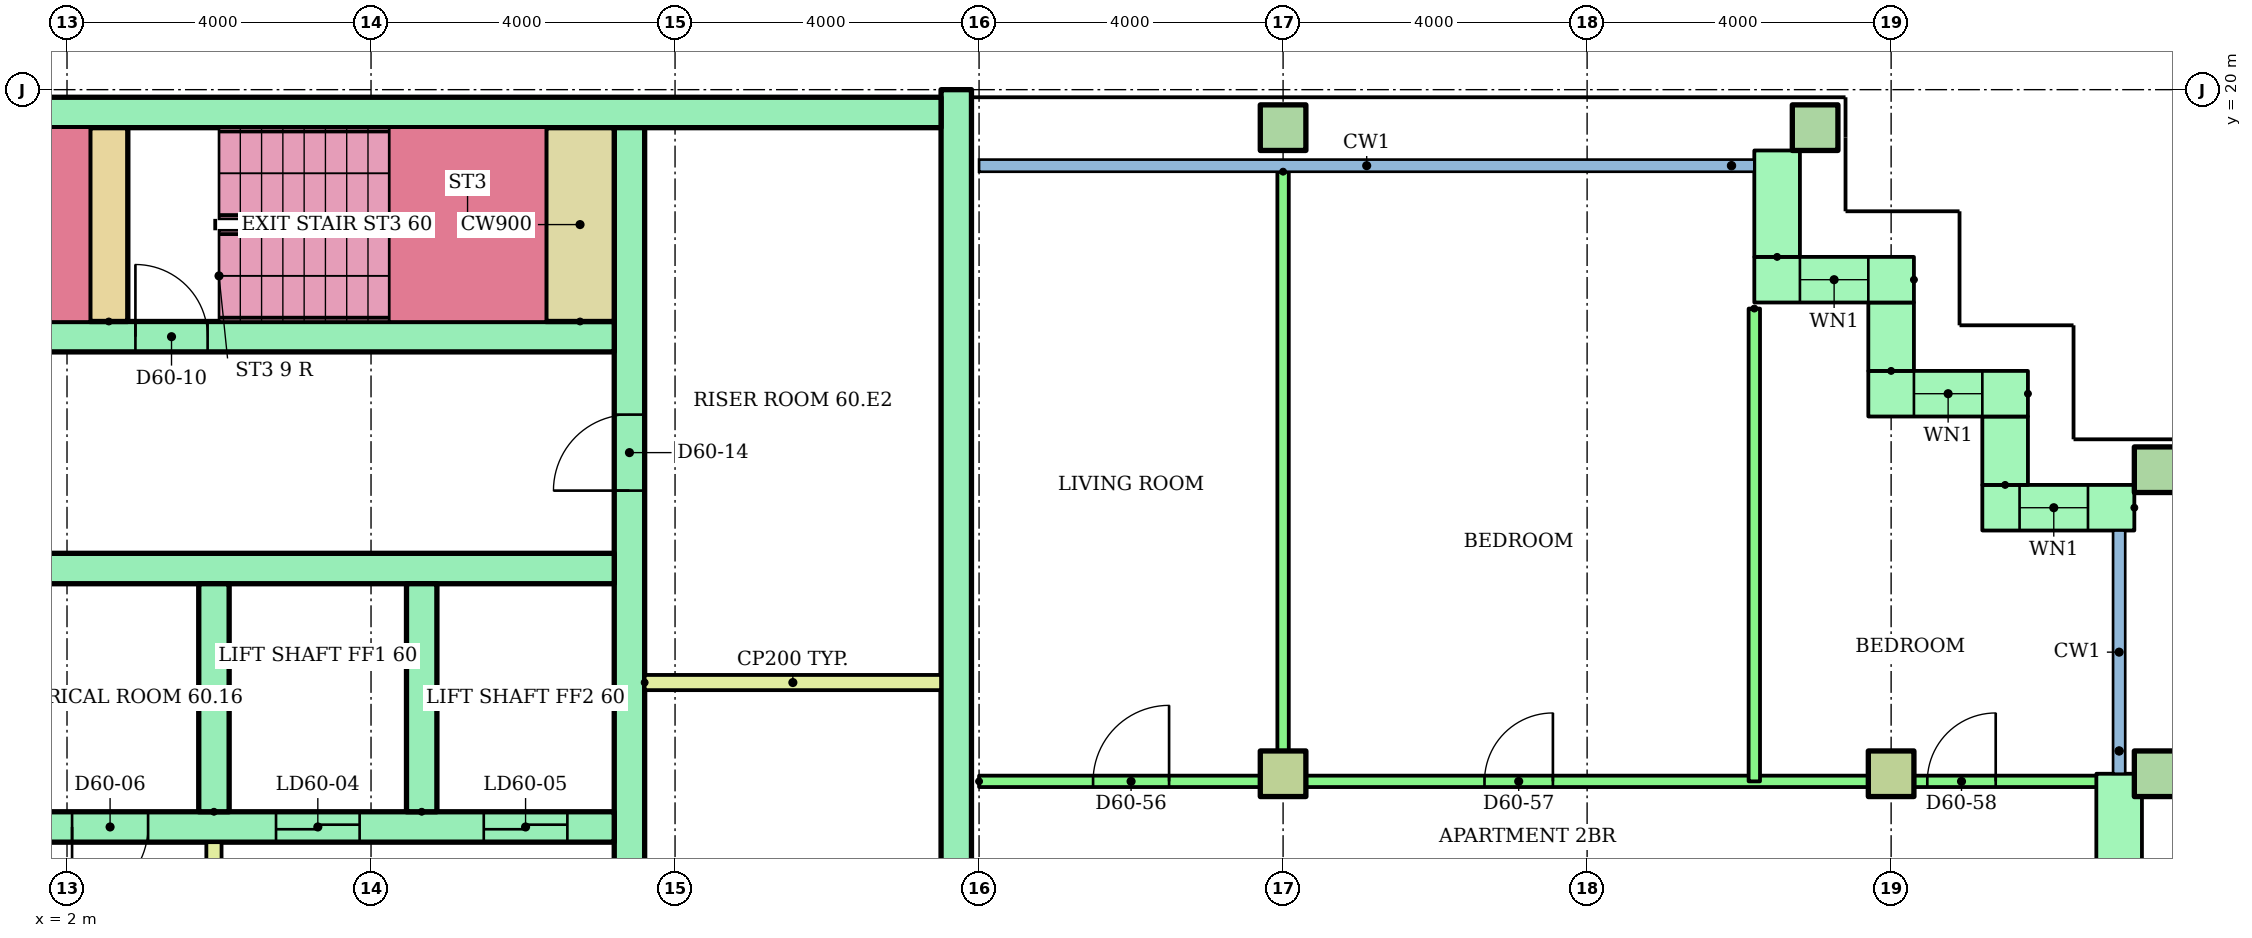
"""IFC4 building model, lengths in metres.
Left out: names, types, materials, properties, quantities, classifications, styles, units other than length and angle.
Written with IfcOpenShell. Run it as: python <this file> out.ifc"""

import sys

from ifc_helpers import new_model, si_unit, direction, frame, frame_2d, origin, origin_2d, place, context, subcontext, project, spatial, rectangle, hollow_rectangle, extrude, element, fill, save


model = new_model("IFC4")
c1 = context("Model", 3, precision=1e-05, world=origin(), true_north=direction((0.0, 1.0)))
c2 = subcontext(c1, "Body", "Model", "MODEL_VIEW")
j1 = project(units=[si_unit("LENGTHUNIT", "METRE"), si_unit("PLANEANGLEUNIT", "RADIAN")], contexts=[c1])
p1 = place(None, origin())
s1 = spatial("IfcSite", under=j1, at=p1, CompositionType="ELEMENT")
p2 = place(p1, origin())
s2 = spatial("IfcBuilding", under=s1, at=p2, CompositionType="ELEMENT")
p3 = place(p2, frame((0.0, 0.0, 230.0)))
s3 = spatial("IfcBuildingStorey", under=s2, at=p3, CompositionType="ELEMENT", Elevation=230.0)
for number, where in (
    (1, (18.0, 11.0, 0.0)),
    (2, (26.0, 11.0, 0.0)),
):
    element("IfcColumn", number, at=place(p3, frame(where)), inside=s3, PredefinedType="COLUMN", context=c2, shape_type="SweptSolid", body=[
        extrude(rectangle(XDim=0.6, YDim=0.6, at=origin_2d()), origin(), (0.0, 0.0, 1.0), 3.2),
    ])
for number, where in (
    (3, (29.5, 11.0, 0.0)),
    (4, (29.5, 15.0, 0.0)),
    (5, (18.0, 19.5, 0.0)),
    (6, (25.0, 19.5, 0.0)),
):
    element("IfcColumn", number, at=place(p3, frame(where)), inside=s3, PredefinedType="COLUMN", context=c2, shape_type="SweptSolid", body=[
        extrude(hollow_rectangle(XDim=0.6, YDim=0.6, WallThickness=0.03, at=origin_2d()), origin(), (0.0, 0.0, 1.0), 3.2),
    ])
p4 = place(p3, frame((29.2, 14.5, 0.0), z_axis=(0.0, 0.0, 1.0), x_axis=(-1.0, 0.0, 0.0)))
e7 = element("IfcWall", 7, at=p4, inside=s3, PredefinedType="STANDARD", context=c2, shape_type="SweptSolid", body=[
    extrude(rectangle(XDim=2.0, YDim=0.6, at=frame_2d((1.0, 0.0))), origin(), (0.0, 0.0, 1.0), 2.92),
])
p5 = place(p4, frame((0.61, 0.0, 0.9)))
e8 = element("IfcOpeningElement", 8, at=p5, cuts=e7, PredefinedType="OPENING", context=c2, shape_type="SweptSolid", body=[
    extrude(rectangle(XDim=0.9, YDim=1.5, at=frame_2d((0.45, 0.75))), frame((0.0, 0.31, 0.0), z_axis=(0.0, -1.0, 0.0), x_axis=(1.0, 0.0, 0.0)), (0.0, 0.0, 1.0), 0.62),
])
p6 = place(p3, frame((27.5, 14.8, 0.0), z_axis=(0.0, 0.0, 1.0), x_axis=(0.0, 1.0, 0.0)))
e9 = element("IfcWall", 9, at=p6, inside=s3, PredefinedType="STANDARD", context=c2, shape_type="SweptSolid", body=[
    extrude(rectangle(XDim=0.9, YDim=0.6, at=frame_2d((0.45, 0.0))), origin(), (0.0, 0.0, 1.0), 2.92),
])
p7 = place(p3, frame((27.8, 16.0, 0.0), z_axis=(0.0, 0.0, 1.0), x_axis=(-1.0, 0.0, 0.0)))
e10 = element("IfcWall", 10, at=p7, inside=s3, PredefinedType="STANDARD", context=c2, shape_type="SweptSolid", body=[
    extrude(rectangle(XDim=2.1, YDim=0.6, at=frame_2d((1.05, 0.0))), origin(), (0.0, 0.0, 1.0), 2.92),
])
p8 = place(p7, frame((0.6, 0.0, 0.9)))
e11 = element("IfcOpeningElement", 11, at=p8, cuts=e10, PredefinedType="OPENING", context=c2, shape_type="SweptSolid", body=[
    extrude(rectangle(XDim=0.9, YDim=1.5, at=frame_2d((0.45, 0.75))), frame((0.0, 0.31, 0.0), z_axis=(0.0, -1.0, 0.0), x_axis=(1.0, 0.0, 0.0)), (0.0, 0.0, 1.0), 0.62),
])
p9 = place(p3, frame((26.0, 16.3, 0.0), z_axis=(0.0, 0.0, 1.0), x_axis=(0.0, 1.0, 0.0)))
e12 = element("IfcWall", 12, at=p9, inside=s3, PredefinedType="STANDARD", context=c2, shape_type="SweptSolid", body=[
    extrude(rectangle(XDim=0.9, YDim=0.6, at=frame_2d((0.45, 0.0))), origin(), (0.0, 0.0, 1.0), 2.92),
])
p10 = place(p3, frame((26.3, 17.5, 0.0), z_axis=(0.0, 0.0, 1.0), x_axis=(-1.0, 0.0, 0.0)))
e13 = element("IfcWall", 13, at=p10, inside=s3, PredefinedType="STANDARD", context=c2, shape_type="SweptSolid", body=[
    extrude(rectangle(XDim=2.1, YDim=0.6, at=frame_2d((1.05, 0.0))), origin(), (0.0, 0.0, 1.0), 2.92),
])
p11 = place(p10, frame((0.6, 0.0, 0.9)))
e14 = element("IfcOpeningElement", 14, at=p11, cuts=e13, PredefinedType="OPENING", context=c2, shape_type="SweptSolid", body=[
    extrude(rectangle(XDim=0.9, YDim=1.5, at=frame_2d((0.45, 0.75))), frame((0.0, 0.31, 0.0), z_axis=(0.0, -1.0, 0.0), x_axis=(1.0, 0.0, 0.0)), (0.0, 0.0, 1.0), 0.62),
])
p12 = place(p3, frame((24.5, 17.8, 0.0), z_axis=(0.0, 0.0, 1.0), x_axis=(0.0, 1.0, 0.0)))
e15 = element("IfcWall", 15, at=p12, inside=s3, PredefinedType="STANDARD", context=c2, shape_type="SweptSolid", body=[
    extrude(rectangle(XDim=1.4, YDim=0.6, at=frame_2d((0.7, 0.0))), origin(), (0.0, 0.0, 1.0), 2.92),
])
p13 = place(p3, frame((29.0, 6.5, 0.0), z_axis=(0.0, 0.0, 1.0), x_axis=(0.0, 1.0, 0.0)))
e16 = element("IfcWall", 16, at=p13, inside=s3, PredefinedType="STANDARD", context=c2, shape_type="SweptSolid", body=[
    extrude(rectangle(XDim=4.5, YDim=0.6, at=frame_2d((2.25, 0.0))), origin(), (0.0, 0.0, 1.0), 2.92),
])
p14 = place(p13, frame((1.525, 0.0, 0.0)))
e17 = element("IfcOpeningElement", 17, at=p14, cuts=e16, PredefinedType="OPENING", context=c2, shape_type="SweptSolid", body=[
    extrude(rectangle(XDim=1.2, YDim=2.1, at=frame_2d((0.6, 1.05))), frame((0.0, 0.31, 0.0), z_axis=(0.0, -1.0, 0.0), x_axis=(1.0, 0.0, 0.0)), (0.0, 0.0, 1.0), 0.62),
])
p15 = place(p3, frame((13.7, 3.0, 0.0), z_axis=(0.0, 0.0, 1.0), x_axis=(0.0, 1.0, 0.0)))
e18 = element("IfcWall", 18, at=p15, inside=s3, PredefinedType="SHEAR", context=c2, shape_type="SweptSolid", body=[
    extrude(rectangle(XDim=17.0, YDim=0.4, at=frame_2d((8.5, 0.0))), origin(), (0.0, 0.0, 1.0), 2.92),
])
p16 = place(p3, frame((-13.5, 19.7, 0.0)))
e19 = element("IfcWall", 19, at=p16, inside=s3, PredefinedType="SHEAR", context=c2, shape_type="SweptSolid", body=[
    extrude(rectangle(XDim=27.0, YDim=0.4, at=frame_2d((13.5, 0.0))), origin(), (0.0, 0.0, 1.0), 2.92),
])
p17 = place(p3, frame((9.4, 6.8, 0.0), z_axis=(0.0, 0.0, 1.0), x_axis=(0.0, 1.0, 0.0)))
e20 = element("IfcWall", 20, at=p17, inside=s3, PredefinedType="SHEAR", context=c2, shape_type="SweptSolid", body=[
    extrude(rectangle(XDim=12.7, YDim=0.4, at=frame_2d((6.35, 0.0))), origin(), (0.0, 0.0, 1.0), 2.92),
])
p18 = place(p17, frame((1.15, 0.0, 0.0)))
e21 = element("IfcOpeningElement", 21, at=p18, cuts=e20, PredefinedType="OPENING", context=c2, shape_type="SweptSolid", body=[
    extrude(rectangle(XDim=1.0, YDim=2.1, at=frame_2d((0.5, 1.05))), frame((0.0, 0.21, 0.0), z_axis=(0.0, -1.0, 0.0), x_axis=(1.0, 0.0, 0.0)), (0.0, 0.0, 1.0), 0.42),
])
p19 = place(p17, frame((7.925, 0.0, 0.0)))
e22 = element("IfcOpeningElement", 22, at=p19, cuts=e20, PredefinedType="OPENING", context=c2, shape_type="SweptSolid", body=[
    extrude(rectangle(XDim=1.0, YDim=2.1, at=frame_2d((0.5, 1.05))), frame((0.0, 0.21, 0.0), z_axis=(0.0, -1.0, 0.0), x_axis=(1.0, 0.0, 0.0)), (0.0, 0.0, 1.0), 0.42),
])
p20 = place(p3, frame((1.2, 10.3, 0.0)))
e23 = element("IfcWall", 23, at=p20, inside=s3, PredefinedType="SHEAR", context=c2, shape_type="SweptSolid", body=[
    extrude(rectangle(XDim=8.0, YDim=0.4, at=frame_2d((4.0, 0.0))), origin(), (0.0, 0.0, 1.0), 2.92),
])
p21 = place(p20, frame((3.55, 0.0, 0.0)))
e24 = element("IfcOpeningElement", 24, at=p21, cuts=e23, PredefinedType="OPENING", context=c2, shape_type="SweptSolid", body=[
    extrude(rectangle(XDim=1.1, YDim=2.1, at=frame_2d((0.55, 1.05))), frame((0.0, 0.21, 0.0), z_axis=(0.0, -1.0, 0.0), x_axis=(1.0, 0.0, 0.0)), (0.0, 0.0, 1.0), 0.42),
])
p22 = place(p20, frame((6.283, 0.0, 0.0)))
e25 = element("IfcOpeningElement", 25, at=p22, cuts=e23, PredefinedType="OPENING", context=c2, shape_type="SweptSolid", body=[
    extrude(rectangle(XDim=1.1, YDim=2.1, at=frame_2d((0.55, 1.05))), frame((0.0, 0.21, 0.0), z_axis=(0.0, -1.0, 0.0), x_axis=(1.0, 0.0, 0.0)), (0.0, 0.0, 1.0), 0.42),
])
p23 = place(p20, frame((0.867, 0.0, 0.0)))
e26 = element("IfcOpeningElement", 26, at=p23, cuts=e23, PredefinedType="OPENING", context=c2, shape_type="SweptSolid", body=[
    extrude(rectangle(XDim=1.0, YDim=2.1, at=frame_2d((0.5, 1.05))), frame((0.0, 0.21, 0.0), z_axis=(0.0, -1.0, 0.0), x_axis=(1.0, 0.0, 0.0)), (0.0, 0.0, 1.0), 0.42),
])
p24 = place(p3, frame((1.2, 13.7, 0.0)))
e27 = element("IfcWall", 27, at=p24, inside=s3, PredefinedType="SHEAR", context=c2, shape_type="SweptSolid", body=[
    extrude(rectangle(XDim=8.0, YDim=0.4, at=frame_2d((4.0, 0.0))), origin(), (0.0, 0.0, 1.0), 2.92),
])
for number, where, z_axis, x_axis in (
    (28, (3.933, 10.5, 0.0), (0.0, 0.0, 1.0), (0.0, 1.0, 0.0)),
    (29, (6.667, 10.5, 0.0), (0.0, 0.0, 1.0), (0.0, 1.0, 0.0)),
):
    element("IfcWall", number, at=place(p3, frame(where, z_axis=z_axis, x_axis=x_axis)), inside=s3, PredefinedType="SHEAR", context=c2, shape_type="SweptSolid", body=[
        extrude(rectangle(XDim=3.0, YDim=0.4, at=frame_2d((1.5, 0.0))), origin(), (0.0, 0.0, 1.0), 2.92),
    ])
p25 = place(p3, frame((3.933, 6.8, 0.0), z_axis=(0.0, 0.0, 1.0), x_axis=(0.0, 1.0, 0.0)))
e30 = element("IfcWall", 30, at=p25, inside=s3, PredefinedType="PARTITIONING", context=c2, shape_type="SweptSolid", body=[
    extrude(rectangle(XDim=3.3, YDim=0.2, at=frame_2d((1.65, 0.0))), origin(), (0.0, 0.0, 1.0), 2.92),
])
p26 = place(p25, frame((1.1, 0.0, 0.0)))
e31 = element("IfcOpeningElement", 31, at=p26, cuts=e30, PredefinedType="OPENING", context=c2, shape_type="SweptSolid", body=[
    extrude(rectangle(XDim=1.1, YDim=2.1, at=frame_2d((0.55, 1.05))), frame((0.0, 0.11, 0.0), z_axis=(0.0, -1.0, 0.0), x_axis=(1.0, 0.0, 0.0)), (0.0, 0.0, 1.0), 0.22),
])
p27 = place(p3, frame((-9.2, 16.75, 0.0)))
e32 = element("IfcWall", 32, at=p27, inside=s3, PredefinedType="SHEAR", context=c2, shape_type="SweptSolid", body=[
    extrude(rectangle(XDim=18.4, YDim=0.4, at=frame_2d((9.2, 0.0))), origin(), (0.0, 0.0, 1.0), 2.92),
])
p28 = place(p27, frame((0.1, 0.0, 0.0)))
e33 = element("IfcOpeningElement", 33, at=p28, cuts=e32, PredefinedType="OPENING", context=c2, shape_type="SweptSolid", body=[
    extrude(rectangle(XDim=0.95, YDim=2.1, at=frame_2d((0.475, 1.05))), frame((0.0, 0.21, 0.0), z_axis=(0.0, -1.0, 0.0), x_axis=(1.0, 0.0, 0.0)), (0.0, 0.0, 1.0), 0.42),
])
p29 = place(p27, frame((6.1, 0.0, 0.0)))
e34 = element("IfcOpeningElement", 34, at=p29, cuts=e32, PredefinedType="OPENING", context=c2, shape_type="SweptSolid", body=[
    extrude(rectangle(XDim=0.95, YDim=2.1, at=frame_2d((0.475, 1.05))), frame((0.0, 0.21, 0.0), z_axis=(0.0, -1.0, 0.0), x_axis=(1.0, 0.0, 0.0)), (0.0, 0.0, 1.0), 0.42),
])
p30 = place(p27, frame((12.1, 0.0, 0.0)))
e35 = element("IfcOpeningElement", 35, at=p30, cuts=e32, PredefinedType="OPENING", context=c2, shape_type="SweptSolid", body=[
    extrude(rectangle(XDim=0.95, YDim=2.1, at=frame_2d((0.475, 1.05))), frame((0.0, 0.21, 0.0), z_axis=(0.0, -1.0, 0.0), x_axis=(1.0, 0.0, 0.0)), (0.0, 0.0, 1.0), 0.42),
])
p31 = place(p3, frame((2.55, 16.95, 0.0), z_axis=(0.0, 0.0, 1.0), x_axis=(0.0, 1.0, 0.0)))
e36 = element("IfcWall", 36, at=p31, inside=s3, PredefinedType="SHEAR", context=c2, shape_type="SweptSolid", body=[
    extrude(rectangle(XDim=2.55, YDim=0.5, at=frame_2d((1.275, 0.0))), origin(), (0.0, 0.0, 1.0), 2.92),
])
p32 = place(p3, frame((8.75, 16.95, 0.0), z_axis=(0.0, 0.0, 1.0), x_axis=(0.0, 1.0, 0.0)))
e37 = element("IfcWall", 37, at=p32, inside=s3, PredefinedType="SHEAR", context=c2, shape_type="SweptSolid", body=[
    extrude(rectangle(XDim=2.55, YDim=0.9, at=frame_2d((1.275, 0.0))), origin(), (0.0, 0.0, 1.0), 2.92),
])
p33 = place(p3, frame((9.6, 12.2, 0.0)))
e38 = element("IfcWall", 38, at=p33, inside=s3, PredefinedType="PARTITIONING", context=c2, shape_type="SweptSolid", body=[
    extrude(rectangle(XDim=3.9, YDim=0.2, at=frame_2d((1.95, 0.0))), origin(), (0.0, 0.0, 1.0), 2.92),
])
p34 = place(p3, frame((14.0, 10.9, 0.0)))
e39 = element("IfcWall", 39, at=p34, inside=s3, PredefinedType="PARTITIONING", context=c2, shape_type="SweptSolid", body=[
    extrude(rectangle(XDim=14.91, YDim=0.15, at=frame_2d((7.455, 0.0))), origin(), (0.0, 0.0, 1.0), 2.4),
])
p35 = place(p34, frame((1.5, 0.0, 0.0)))
e40 = element("IfcOpeningElement", 40, at=p35, cuts=e39, PredefinedType="OPENING", context=c2, shape_type="SweptSolid", body=[
    extrude(rectangle(XDim=1.0, YDim=2.1, at=frame_2d((0.5, 1.05))), frame((0.0, 0.085, 0.0), z_axis=(0.0, -1.0, 0.0), x_axis=(1.0, 0.0, 0.0)), (0.0, 0.0, 1.0), 0.17),
])
p36 = place(p34, frame((6.65, 0.0, 0.0)))
e41 = element("IfcOpeningElement", 41, at=p36, cuts=e39, PredefinedType="OPENING", context=c2, shape_type="SweptSolid", body=[
    extrude(rectangle(XDim=0.9, YDim=2.1, at=frame_2d((0.45, 1.05))), frame((0.0, 0.085, 0.0), z_axis=(0.0, -1.0, 0.0), x_axis=(1.0, 0.0, 0.0)), (0.0, 0.0, 1.0), 0.17),
])
p37 = place(p34, frame((12.476, 0.0, 0.0)))
e42 = element("IfcOpeningElement", 42, at=p37, cuts=e39, PredefinedType="OPENING", context=c2, shape_type="SweptSolid", body=[
    extrude(rectangle(XDim=0.9, YDim=2.1, at=frame_2d((0.45, 1.05))), frame((0.0, 0.085, 0.0), z_axis=(0.0, -1.0, 0.0), x_axis=(1.0, 0.0, 0.0)), (0.0, 0.0, 1.0), 0.17),
])
p38 = place(p3, frame((18.0, 18.921, 0.0), z_axis=(0.0, 0.0, 1.0), x_axis=(0.0, -1.0, 0.0)))
e43 = element("IfcWall", 43, at=p38, inside=s3, PredefinedType="PARTITIONING", context=c2, shape_type="SweptSolid", body=[
    extrude(rectangle(XDim=8.021, YDim=0.15, at=frame_2d((4.01, 0.0))), origin(), (0.0, 0.0, 1.0), 2.4),
])
p39 = place(p3, frame((24.2, 17.12, 0.0), z_axis=(0.0, 0.0, 1.0), x_axis=(0.0, -1.0, 0.0)))
e44 = element("IfcWall", 44, at=p39, inside=s3, PredefinedType="PARTITIONING", context=c2, shape_type="SweptSolid", body=[
    extrude(rectangle(XDim=6.22, YDim=0.15, at=frame_2d((3.11, 0.0))), origin(), (0.0, 0.0, 1.0), 2.4),
])
p40 = place(p5, origin())
e45 = element("IfcWindow", 45, at=p40, inside=s3, PartitioningType="SINGLE_PANEL", PredefinedType="WINDOW", context=c2, shape_type="SweptSolid", body=[
    extrude(rectangle(XDim=0.9, YDim=1.5, at=frame_2d((0.45, 0.75))), frame((0.0, 0.03, 0.0), z_axis=(0.0, -1.0, 0.0), x_axis=(1.0, 0.0, 0.0)), (0.0, 0.0, 1.0), 0.06),
])
fill(e8, e45)
p41 = place(p8, origin())
e46 = element("IfcWindow", 46, at=p41, inside=s3, PartitioningType="SINGLE_PANEL", PredefinedType="WINDOW", context=c2, shape_type="SweptSolid", body=[
    extrude(rectangle(XDim=0.9, YDim=1.5, at=frame_2d((0.45, 0.75))), frame((0.0, 0.03, 0.0), z_axis=(0.0, -1.0, 0.0), x_axis=(1.0, 0.0, 0.0)), (0.0, 0.0, 1.0), 0.06),
])
fill(e11, e46)
p42 = place(p11, origin())
e47 = element("IfcWindow", 47, at=p42, inside=s3, PartitioningType="SINGLE_PANEL", PredefinedType="WINDOW", context=c2, shape_type="SweptSolid", body=[
    extrude(rectangle(XDim=0.9, YDim=1.5, at=frame_2d((0.45, 0.75))), frame((0.0, 0.03, 0.0), z_axis=(0.0, -1.0, 0.0), x_axis=(1.0, 0.0, 0.0)), (0.0, 0.0, 1.0), 0.06),
])
fill(e14, e47)
p43 = place(p21, origin())
e48 = element("IfcDoor", 48, at=p43, inside=s3, OperationType="SLIDING_TO_LEFT", PredefinedType="DOOR", context=c2, shape_type="SweptSolid", body=[
    extrude(rectangle(XDim=1.1, YDim=2.1, at=frame_2d((0.55, 1.05))), frame((0.0, 0.025, 0.0), z_axis=(0.0, -1.0, 0.0), x_axis=(1.0, 0.0, 0.0)), (0.0, 0.0, 1.0), 0.05),
])
fill(e24, e48)
p44 = place(p22, origin())
e49 = element("IfcDoor", 49, at=p44, inside=s3, OperationType="SLIDING_TO_LEFT", PredefinedType="DOOR", context=c2, shape_type="SweptSolid", body=[
    extrude(rectangle(XDim=1.1, YDim=2.1, at=frame_2d((0.55, 1.05))), frame((0.0, 0.025, 0.0), z_axis=(0.0, -1.0, 0.0), x_axis=(1.0, 0.0, 0.0)), (0.0, 0.0, 1.0), 0.05),
])
fill(e25, e49)
p45 = place(p23, frame((1.0, 0.0, 0.0), z_axis=(0.0, 0.0, 1.0), x_axis=(-1.0, 0.0, 0.0)))
e50 = element("IfcDoor", 50, at=p45, inside=s3, OperationType="SINGLE_SWING_LEFT", PredefinedType="DOOR", context=c2, shape_type="SweptSolid", body=[
    extrude(rectangle(XDim=1.0, YDim=2.1, at=frame_2d((0.5, 1.05))), frame((0.0, 0.025, 0.0), z_axis=(0.0, -1.0, 0.0), x_axis=(1.0, 0.0, 0.0)), (0.0, 0.0, 1.0), 0.05),
])
fill(e26, e50)
p46 = place(p30, origin())
e51 = element("IfcDoor", 51, at=p46, inside=s3, OperationType="SINGLE_SWING_LEFT", PredefinedType="DOOR", context=c2, shape_type="SweptSolid", body=[
    extrude(rectangle(XDim=0.95, YDim=2.1, at=frame_2d((0.475, 1.05))), frame((0.0, 0.025, 0.0), z_axis=(0.0, -1.0, 0.0), x_axis=(1.0, 0.0, 0.0)), (0.0, 0.0, 1.0), 0.05),
])
fill(e35, e51)
p47 = place(p19, origin())
e52 = element("IfcDoor", 52, at=p47, inside=s3, OperationType="SINGLE_SWING_LEFT", PredefinedType="DOOR", context=c2, shape_type="SweptSolid", body=[
    extrude(rectangle(XDim=1.0, YDim=2.1, at=frame_2d((0.5, 1.05))), frame((0.0, 0.025, 0.0), z_axis=(0.0, -1.0, 0.0), x_axis=(1.0, 0.0, 0.0)), (0.0, 0.0, 1.0), 0.05),
])
fill(e22, e52)
p48 = place(p35, origin())
e53 = element("IfcDoor", 53, at=p48, inside=s3, OperationType="SINGLE_SWING_RIGHT", PredefinedType="DOOR", context=c2, shape_type="SweptSolid", body=[
    extrude(rectangle(XDim=1.0, YDim=2.1, at=frame_2d((0.5, 1.05))), frame((0.0, 0.025, 0.0), z_axis=(0.0, -1.0, 0.0), x_axis=(1.0, 0.0, 0.0)), (0.0, 0.0, 1.0), 0.05),
])
fill(e40, e53)
p49 = place(p36, origin())
e54 = element("IfcDoor", 54, at=p49, inside=s3, OperationType="SINGLE_SWING_RIGHT", PredefinedType="DOOR", context=c2, shape_type="SweptSolid", body=[
    extrude(rectangle(XDim=0.9, YDim=2.1, at=frame_2d((0.45, 1.05))), frame((0.0, 0.025, 0.0), z_axis=(0.0, -1.0, 0.0), x_axis=(1.0, 0.0, 0.0)), (0.0, 0.0, 1.0), 0.05),
])
fill(e41, e54)
p50 = place(p37, origin())
e55 = element("IfcDoor", 55, at=p50, inside=s3, OperationType="SINGLE_SWING_RIGHT", PredefinedType="DOOR", context=c2, shape_type="SweptSolid", body=[
    extrude(rectangle(XDim=0.9, YDim=2.1, at=frame_2d((0.45, 1.05))), frame((0.0, 0.025, 0.0), z_axis=(0.0, -1.0, 0.0), x_axis=(1.0, 0.0, 0.0)), (0.0, 0.0, 1.0), 0.05),
])
fill(e42, e55)
save(model, sys.argv[1])
